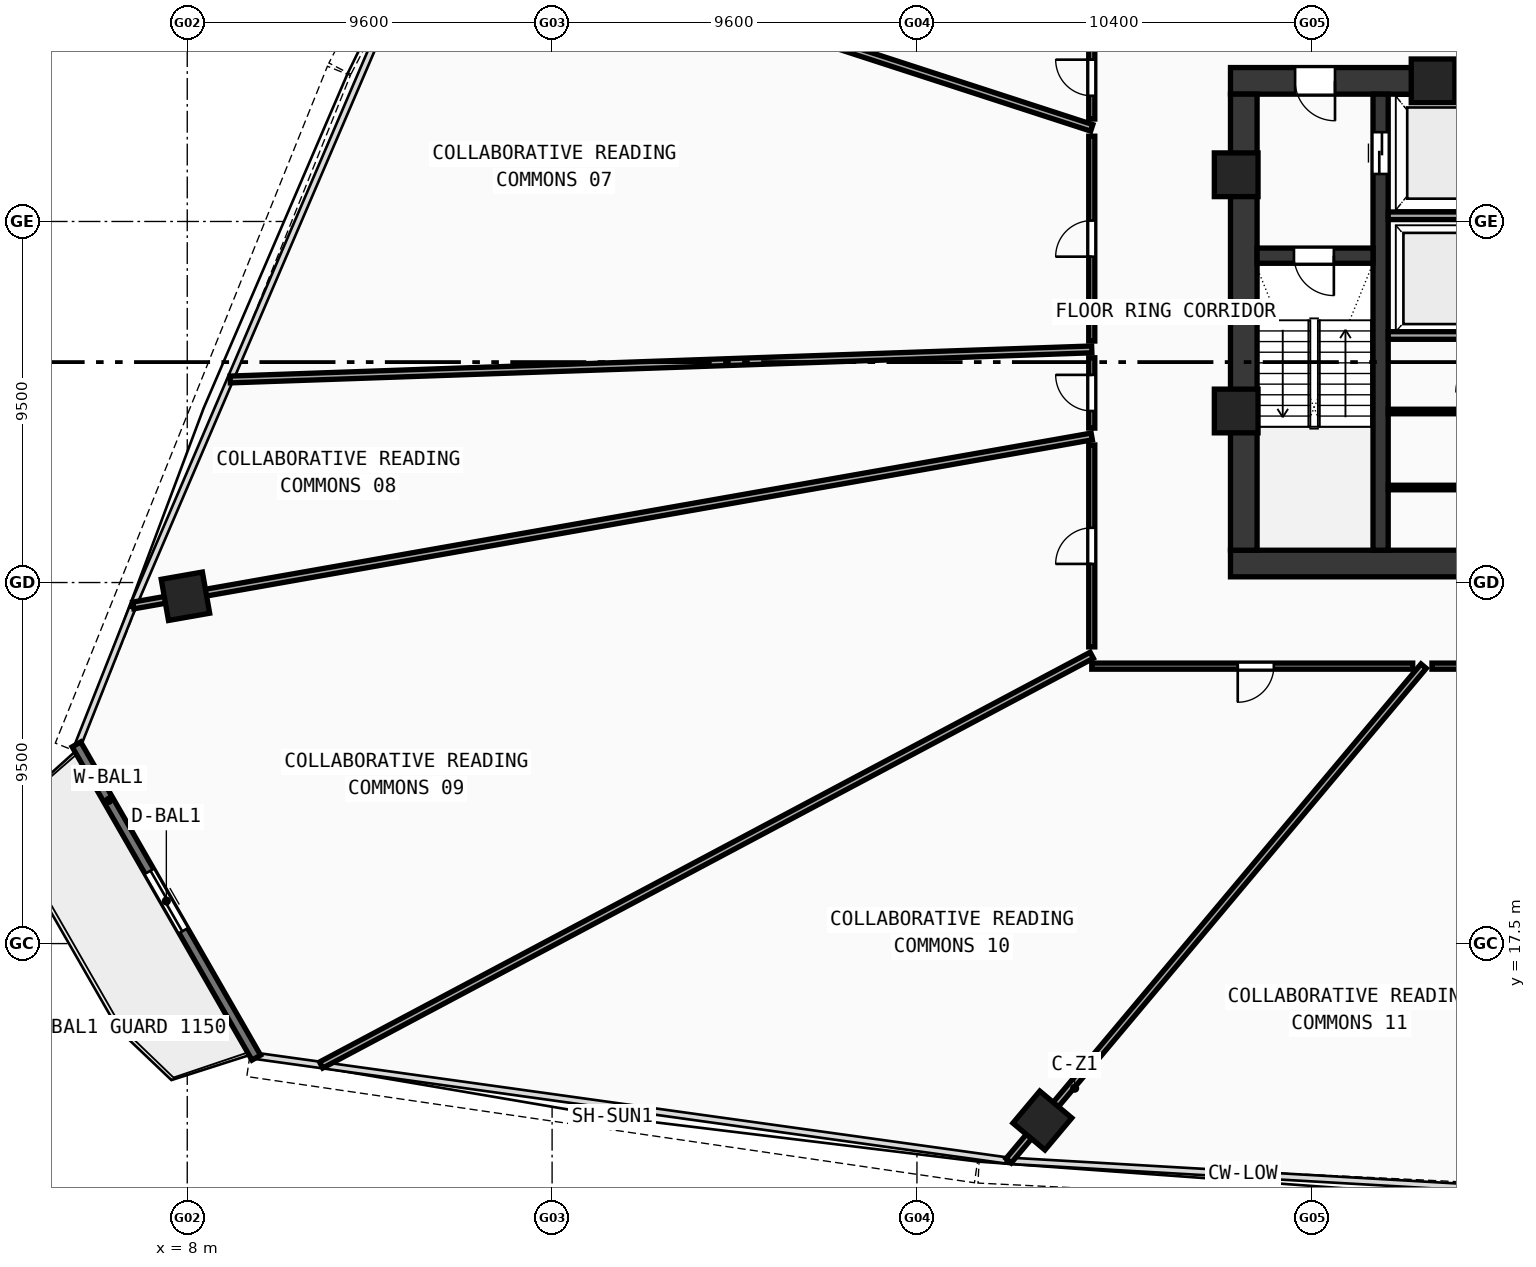
"""IFC4 building model, lengths in metres.
Left out: names, types, materials, properties, quantities, classifications, styles, units other than length and angle.
Written with IfcOpenShell. Run it as: python <this file> out.ifc"""

import sys

from ifc_helpers import new_model, si_unit, direction, frame, frame_2d, origin, origin_with_axes, origin_2d, place, context, subcontext, project, spatial, rectangle, hollow_rectangle, extrude, source, transform, mapped, element, fill, save


model = new_model("IFC4")
c1 = context("Model", 3, precision=1e-05, world=origin(), true_north=direction((0.0, 1.0)))
c2 = subcontext(c1, "Body", "Model", "MODEL_VIEW")
j1 = project(units=[si_unit("LENGTHUNIT", "METRE"), si_unit("PLANEANGLEUNIT", "RADIAN")], contexts=[c1])
p1 = place(None, origin())
s1 = spatial("IfcSite", under=j1, at=p1, CompositionType="ELEMENT")
p2 = place(p1, origin())
s2 = spatial("IfcBuilding", under=s1, at=p2, CompositionType="ELEMENT")
p3 = place(p2, frame((0.0, 0.0, 55.81)))
s3 = spatial("IfcBuildingStorey", under=s2, at=p3, CompositionType="ELEMENT", Elevation=55.81)
p4 = place(p3, frame((35.45, 27.5, 0.0), z_axis=(0.0, 0.0, 1.0), x_axis=(1.0, 0.0, 0.0)))
e1 = element("IfcWall", 1, at=p4, inside=s3, PredefinedType="SHEAR", context=c2, shape_type="SweptSolid", body=[
    extrude(rectangle(XDim=25.1, YDim=0.7, at=frame_2d((12.55, 0.0))), origin(), (0.0, 0.0, 1.0), 3.37),
])
p5 = place(p3, frame((35.45, 40.2, 0.0), z_axis=(0.0, 0.0, 1.0), x_axis=(1.0, 0.0, 0.0)))
e2 = element("IfcWall", 2, at=p5, inside=s3, PredefinedType="SHEAR", context=c2, shape_type="SweptSolid", body=[
    extrude(rectangle(XDim=11.35, YDim=0.7, at=frame_2d((5.675, 0.0))), origin(), (0.0, 0.0, 1.0), 3.37),
])
p6 = place(p5, frame((1.7, 0.0, 0.0)))
e3 = element("IfcOpeningElement", 3, at=p6, cuts=e2, PredefinedType="OPENING", context=c2, shape_type="SweptSolid", body=[
    extrude(rectangle(XDim=1.05, YDim=2.1, at=frame_2d((0.525, 1.05))), frame((0.0, 0.36, 0.0), z_axis=(0.0, -1.0, 0.0), x_axis=(1.0, 0.0, 0.0)), (0.0, 0.0, 1.0), 0.72),
])
p7 = place(p3, frame((35.8, 27.85, 0.0), z_axis=(0.0, 0.0, 1.0), x_axis=(0.0, 1.0, 0.0)))
e4 = element("IfcWall", 4, at=p7, inside=s3, PredefinedType="SHEAR", context=c2, shape_type="SweptSolid", body=[
    extrude(rectangle(XDim=12.0, YDim=0.7, at=frame_2d((6.0, 0.0))), origin(), (0.0, 0.0, 1.0), 3.37),
])
p8 = place(p3, frame((39.4, 27.85, 0.0), z_axis=(0.0, 0.0, 1.0), x_axis=(0.0, 1.0, 0.0)))
e5 = element("IfcWall", 5, at=p8, inside=s3, PredefinedType="SHEAR", context=c2, shape_type="SweptSolid", body=[
    extrude(rectangle(XDim=12.0, YDim=0.4, at=frame_2d((6.0, 0.0))), origin(), (0.0, 0.0, 1.0), 3.37),
])
p9 = place(p8, frame((9.9, 0.0, 0.0)))
e6 = element("IfcOpeningElement", 6, at=p9, cuts=e5, PredefinedType="OPENING", context=c2, shape_type="SweptSolid", body=[
    extrude(rectangle(XDim=1.1, YDim=2.1, at=frame_2d((0.55, 1.05))), frame((0.0, 0.21, 0.0), z_axis=(0.0, -1.0, 0.0), x_axis=(1.0, 0.0, 0.0)), (0.0, 0.0, 1.0), 0.42),
])
p10 = place(p3, frame((36.15, 35.6, 0.0), z_axis=(0.0, 0.0, 1.0), x_axis=(1.0, 0.0, 0.0)))
e7 = element("IfcWall", 7, at=p10, inside=s3, PredefinedType="SHEAR", context=c2, shape_type="SweptSolid", body=[
    extrude(rectangle(XDim=3.05, YDim=0.4, at=frame_2d((1.525, 0.0))), origin(), (0.0, 0.0, 1.0), 3.37),
])
p11 = place(p10, frame((0.97, 0.0, 0.0)))
e8 = element("IfcOpeningElement", 8, at=p11, cuts=e7, PredefinedType="OPENING", context=c2, shape_type="SweptSolid", body=[
    extrude(rectangle(XDim=1.05, YDim=2.1, at=frame_2d((0.525, 1.05))), frame((0.0, 0.21, 0.0), z_axis=(0.0, -1.0, 0.0), x_axis=(1.0, 0.0, 0.0)), (0.0, 0.0, 1.0), 0.42),
])
m1 = source(origin(), c2, "Body", "SweptSolid", [
    extrude(hollow_rectangle(XDim=1.15, YDim=1.15, WallThickness=0.048, at=origin_2d()), origin(), (0.0, 0.0, 1.0), 3.63),
])
for number, where, z_axis, x_axis in (
    (9, (40.781, 40.2, -0.26), (0.0, 0.0, 1.0), (1.0, 0.0, 0.0)),
    (10, (35.6, 37.729, -0.26), (0.0, 0.0, 1.0), (1.0, 0.0, 0.0)),
    (11, (35.6, 31.513, -0.26), (0.0, 0.0, 1.0), (1.0, 0.0, 0.0)),
):
    element("IfcColumn", number, at=place(p3, frame(where, z_axis=z_axis, x_axis=x_axis)), inside=s3, PredefinedType="COLUMN", context=c2, shape_type="MappedRepresentation", body=[
        mapped(m1, transform((0.0, 0.0, 0.0), scale=1.0)),
    ])
m2 = source(origin(), c2, "Body", "SweptSolid", [
    extrude(hollow_rectangle(XDim=1.1, YDim=1.1, WallThickness=0.045, at=origin_2d()), origin(), (0.0, 0.0, 1.0), 3.63),
])
for number, where, z_axis, x_axis in (
    (12, (30.5, 12.844, -0.26), (0.0, 0.0, 1.0), (0.766, -0.643, 0.0)),
    (13, (7.952, 26.638, -0.26), (0.0, 0.0, 1.0), (0.174, -0.985, 0.0)),
):
    element("IfcColumn", number, at=place(p3, frame(where, z_axis=z_axis, x_axis=x_axis)), inside=s3, PredefinedType="COLUMN", context=c2, shape_type="MappedRepresentation", body=[
        mapped(m2, transform((0.0, 0.0, 0.0), scale=1.0)),
    ])
p12 = place(p3, frame((5.084, 22.741, 0.0), z_axis=(0.0, 0.0, 1.0), x_axis=(0.497919395469, -0.86722331358, 0.0)))
e14 = element("IfcWall", 14, at=p12, inside=s3, PredefinedType="STANDARD", context=c2, shape_type="SweptSolid", body=[
    extrude(rectangle(XDim=9.504, YDim=0.26, at=frame_2d((4.752, 0.0))), origin(), (0.0, 0.0, 1.0), 3.37),
])
p13 = place(p12, frame((3.852, 0.0, 0.0)))
e15 = element("IfcOpeningElement", 15, at=p13, cuts=e14, PredefinedType="OPENING", context=c2, shape_type="SweptSolid", body=[
    extrude(rectangle(XDim=1.8, YDim=2.15, at=frame_2d((0.9, 1.075))), frame((0.0, 0.14, 0.0), z_axis=(0.0, -1.0, 0.0), x_axis=(1.0, 0.0, 0.0)), (0.0, 0.0, 1.0), 0.28),
])
for number, where, z_axis, x_axis in (
    (16, (39.6, 36.65, 0.0), (0.0, 0.0, 1.0), (1.0, 0.0, 0.0)),
    (17, (39.6, 33.5, 0.0), (0.0, 0.0, 1.0), (1.0, 0.0, 0.0)),
):
    element("IfcWall", number, at=place(p3, frame(where, z_axis=z_axis, x_axis=x_axis)), inside=s3, PredefinedType="SOLIDWALL", context=c2, shape_type="SweptSolid", body=[
        extrude(rectangle(XDim=2.72, YDim=0.2, at=frame_2d((1.36, 0.0))), origin(), (0.0, 0.0, 1.0), 3.37),
    ])
for number, where, z_axis, x_axis in (
    (18, (39.6, 29.5, 0.0), (0.0, 0.0, 1.0), (1.0, 0.0, 0.0)),
    (19, (39.6, 31.5, 0.0), (0.0, 0.0, 1.0), (1.0, 0.0, 0.0)),
):
    element("IfcWall", number, at=place(p3, frame(where, z_axis=z_axis, x_axis=x_axis)), inside=s3, PredefinedType="PARTITIONING", context=c2, shape_type="SweptSolid", body=[
        extrude(rectangle(XDim=2.72, YDim=0.12, at=frame_2d((1.36, 0.0))), origin(), (0.0, 0.0, 1.0), 3.37),
    ])
p14 = place(p3, frame((31.8, 38.964, 0.0), z_axis=(0.0, 0.0, 1.0), x_axis=(-0.951052304058, 0.309029958006, 0.0)))
e20 = element("IfcWall", 20, at=p14, inside=s3, PredefinedType="PARTITIONING", context=c2, shape_type="SweptSolid", body=[
    extrude(rectangle(XDim=18.299, YDim=0.18, at=frame_2d((9.149, 0.0))), origin(), (0.0, 0.0, 1.0), 2.67),
])
p15 = place(p3, frame((31.8, 33.134, 0.0), z_axis=(0.0, 0.0, 1.0), x_axis=(-0.999390651746, -0.034904515515, 0.0)))
e21 = element("IfcWall", 21, at=p15, inside=s3, PredefinedType="PARTITIONING", context=c2, shape_type="SweptSolid", body=[
    extrude(rectangle(XDim=22.683, YDim=0.18, at=frame_2d((11.342, 0.0))), origin(), (0.0, 0.0, 1.0), 2.67),
])
p16 = place(p3, frame((31.8, 30.844, 0.0), z_axis=(0.0, 0.0, 1.0), x_axis=(-0.984808213418, -0.173645566555, 0.0)))
e22 = element("IfcWall", 22, at=p16, inside=s3, PredefinedType="PARTITIONING", context=c2, shape_type="SweptSolid", body=[
    extrude(rectangle(XDim=25.61, YDim=0.18, at=frame_2d((12.805, 0.0))), origin(), (0.0, 0.0, 1.0), 2.67),
])
p17 = place(p3, frame((31.8, 25.086, 0.0), z_axis=(0.0, 0.0, 1.0), x_axis=(-0.882952279159, -0.469462749032, 0.0)))
e23 = element("IfcWall", 23, at=p17, inside=s3, PredefinedType="PARTITIONING", context=c2, shape_type="SweptSolid", body=[
    extrude(rectangle(XDim=22.965, YDim=0.18, at=frame_2d((11.482, 0.0))), origin(), (0.0, 0.0, 1.0), 2.67),
])
p18 = place(p3, frame((40.532, 24.8, 0.0), z_axis=(0.0, 0.0, 1.0), x_axis=(-0.642791593325, -0.766041100432, 0.0)))
e24 = element("IfcWall", 24, at=p18, inside=s3, PredefinedType="PARTITIONING", context=c2, shape_type="SweptSolid", body=[
    extrude(rectangle(XDim=16.988, YDim=0.18, at=frame_2d((8.494, 0.0))), origin(), (0.0, 0.0, 1.0), 2.67),
])
p19 = place(p3, frame((31.8, 25.306, 0.0), z_axis=(0.0, 0.0, 1.0), x_axis=(0.0, 1.0, 0.0)))
e25 = element("IfcWall", 25, at=p19, inside=s3, PredefinedType="PARTITIONING", context=c2, shape_type="SweptSolid", body=[
    extrude(rectangle(XDim=5.314, YDim=0.16, at=frame_2d((2.657, 0.0))), origin(), (0.0, 0.0, 1.0), 2.97),
])
p20 = place(p19, frame((2.184, 0.0, 0.0)))
e26 = element("IfcOpeningElement", 26, at=p20, cuts=e25, PredefinedType="OPENING", context=c2, shape_type="SweptSolid", body=[
    extrude(rectangle(XDim=0.95, YDim=2.1, at=frame_2d((0.475, 1.05))), frame((0.0, 0.09, 0.0), z_axis=(0.0, -1.0, 0.0), x_axis=(1.0, 0.0, 0.0)), (0.0, 0.0, 1.0), 0.18),
])
p21 = place(p3, frame((31.8, 31.063, 0.0), z_axis=(0.0, 0.0, 1.0), x_axis=(0.0, 1.0, 0.0)))
e27 = element("IfcWall", 27, at=p21, inside=s3, PredefinedType="PARTITIONING", context=c2, shape_type="SweptSolid", body=[
    extrude(rectangle(XDim=1.851, YDim=0.16, at=frame_2d((0.926, 0.0))), origin(), (0.0, 0.0, 1.0), 3.37),
])
p22 = place(p21, frame((0.451, 0.0, 0.0)))
e28 = element("IfcOpeningElement", 28, at=p22, cuts=e27, PredefinedType="OPENING", context=c2, shape_type="SweptSolid", body=[
    extrude(rectangle(XDim=0.95, YDim=2.1, at=frame_2d((0.475, 1.05))), frame((0.0, 0.09, 0.0), z_axis=(0.0, -1.0, 0.0), x_axis=(1.0, 0.0, 0.0)), (0.0, 0.0, 1.0), 0.18),
])
p23 = place(p3, frame((31.8, 33.354, 0.0), z_axis=(0.0, 0.0, 1.0), x_axis=(0.0, 1.0, 0.0)))
e29 = element("IfcWall", 29, at=p23, inside=s3, PredefinedType="PARTITIONING", context=c2, shape_type="SweptSolid", body=[
    extrude(rectangle(XDim=5.39, YDim=0.16, at=frame_2d((2.695, 0.0))), origin(), (0.0, 0.0, 1.0), 3.37),
])
p24 = place(p23, frame((2.22, 0.0, 0.0)))
e30 = element("IfcOpeningElement", 30, at=p24, cuts=e29, PredefinedType="OPENING", context=c2, shape_type="SweptSolid", body=[
    extrude(rectangle(XDim=0.95, YDim=2.1, at=frame_2d((0.475, 1.05))), frame((0.0, 0.09, 0.0), z_axis=(0.0, -1.0, 0.0), x_axis=(1.0, 0.0, 0.0)), (0.0, 0.0, 1.0), 0.18),
])
p25 = place(p3, frame((31.8, 39.195, 0.0), z_axis=(0.0, 0.0, 1.0), x_axis=(0.0, 1.0, 0.0)))
e31 = element("IfcWall", 31, at=p25, inside=s3, PredefinedType="PARTITIONING", context=c2, shape_type="SweptSolid", body=[
    extrude(rectangle(XDim=2.187, YDim=0.16, at=frame_2d((1.093, 0.0))), origin(), (0.0, 0.0, 1.0), 3.37),
])
p26 = place(p25, frame((0.613, 0.0, 0.0)))
e32 = element("IfcOpeningElement", 32, at=p26, cuts=e31, PredefinedType="OPENING", context=c2, shape_type="SweptSolid", body=[
    extrude(rectangle(XDim=0.95, YDim=2.1, at=frame_2d((0.475, 1.05))), frame((0.0, 0.09, 0.0), z_axis=(0.0, -1.0, 0.0), x_axis=(1.0, 0.0, 0.0)), (0.0, 0.0, 1.0), 0.18),
])
p27 = place(p3, frame((45.387, 24.8, 0.0), z_axis=(0.0, 0.0, 1.0), x_axis=(-1.0, 0.0, 0.0)))
e33 = element("IfcWall", 33, at=p27, inside=s3, PredefinedType="PARTITIONING", context=c2, shape_type="SweptSolid", body=[
    extrude(rectangle(XDim=4.635, YDim=0.16, at=frame_2d((2.318, 0.0))), origin(), (0.0, 0.0, 1.0), 2.67),
])
p28 = place(p27, frame((1.839, 0.0, 0.0)))
e34 = element("IfcOpeningElement", 34, at=p28, cuts=e33, PredefinedType="OPENING", context=c2, shape_type="SweptSolid", body=[
    extrude(rectangle(XDim=0.95, YDim=2.1, at=frame_2d((0.475, 1.05))), frame((0.0, 0.09, 0.0), z_axis=(0.0, -1.0, 0.0), x_axis=(1.0, 0.0, 0.0)), (0.0, 0.0, 1.0), 0.18),
])
p29 = place(p3, frame((40.245, 24.8, 0.0), z_axis=(0.0, 0.0, 1.0), x_axis=(-1.0, 0.0, 0.0)))
e35 = element("IfcWall", 35, at=p29, inside=s3, PredefinedType="PARTITIONING", context=c2, shape_type="SweptSolid", body=[
    extrude(rectangle(XDim=8.445, YDim=0.16, at=frame_2d((4.222, 0.0))), origin(), (0.0, 0.0, 1.0), 2.97),
])
p30 = place(p29, frame((3.654, 0.0, 0.0)))
e36 = element("IfcOpeningElement", 36, at=p30, cuts=e35, PredefinedType="OPENING", context=c2, shape_type="SweptSolid", body=[
    extrude(rectangle(XDim=0.95, YDim=2.1, at=frame_2d((0.475, 1.05))), frame((0.0, 0.09, 0.0), z_axis=(0.0, -1.0, 0.0), x_axis=(1.0, 0.0, 0.0)), (0.0, 0.0, 1.0), 0.18),
])
m3 = source(origin(), c2, "Body", "SweptSolid", [
    extrude(rectangle(XDim=1.8, YDim=2.15, at=frame_2d((0.9, 1.075))), frame((0.0, 0.025, 0.0), z_axis=(0.0, -1.0, 0.0), x_axis=(1.0, 0.0, 0.0)), (0.0, 0.0, 1.0), 0.05),
])
p31 = place(p13, origin_with_axes())
e37 = element("IfcDoor", 37, at=p31, inside=s3, OperationType="DOUBLE_DOOR_SLIDING", PredefinedType="DOOR", context=c2, shape_type="MappedRepresentation", body=[
    mapped(m3, transform((0.0, 0.0, 0.0), scale=1.0)),
])
fill(e15, e37)
m4 = source(origin(), c2, "Body", "SweptSolid", [
    extrude(rectangle(XDim=1.05, YDim=2.1, at=frame_2d((0.525, 1.05))), frame((0.0, 0.025, 0.0), z_axis=(0.0, -1.0, 0.0), x_axis=(1.0, 0.0, 0.0)), (0.0, 0.0, 1.0), 0.05),
])
p32 = place(p11, frame((1.05, 0.0, 0.0), z_axis=(0.0, 0.0, 1.0), x_axis=(-1.0, 0.0, 0.0)))
e38 = element("IfcDoor", 38, at=p32, inside=s3, OperationType="SINGLE_SWING_LEFT", PredefinedType="DOOR", context=c2, shape_type="MappedRepresentation", body=[
    mapped(m4, transform((0.0, 0.0, 0.0), scale=1.0)),
])
fill(e8, e38)
p33 = place(p6, frame((1.05, 0.0, 0.0), z_axis=(0.0, 0.0, 1.0), x_axis=(-1.0, 0.0, 0.0)))
e39 = element("IfcDoor", 39, at=p33, inside=s3, OperationType="SINGLE_SWING_LEFT", PredefinedType="DOOR", context=c2, shape_type="MappedRepresentation", body=[
    mapped(m4, transform((0.0, 0.0, 0.0), scale=1.0)),
])
fill(e3, e39)
m5 = source(origin(), c2, "Body", "SweptSolid", [
    extrude(rectangle(XDim=1.1, YDim=2.1, at=frame_2d((0.55, 1.05))), frame((0.0, 0.025, 0.0), z_axis=(0.0, -1.0, 0.0), x_axis=(1.0, 0.0, 0.0)), (0.0, 0.0, 1.0), 0.05),
])
p34 = place(p9, frame((1.1, 0.0, 0.0), z_axis=(0.0, 0.0, 1.0), x_axis=(-1.0, 0.0, 0.0)))
e40 = element("IfcDoor", 40, at=p34, inside=s3, OperationType="DOUBLE_DOOR_SLIDING", PredefinedType="DOOR", context=c2, shape_type="MappedRepresentation", body=[
    mapped(m5, transform((0.0, 0.0, 0.0), scale=1.0)),
])
fill(e6, e40)
m6 = source(origin(), c2, "Body", "SweptSolid", [
    extrude(rectangle(XDim=0.95, YDim=2.1, at=frame_2d((0.475, 1.05))), frame((0.0, 0.025, 0.0), z_axis=(0.0, -1.0, 0.0), x_axis=(1.0, 0.0, 0.0)), (0.0, 0.0, 1.0), 0.05),
])
p35 = place(p26, origin_with_axes())
e41 = element("IfcDoor", 41, at=p35, inside=s3, OperationType="SINGLE_SWING_RIGHT", PredefinedType="DOOR", context=c2, shape_type="MappedRepresentation", body=[
    mapped(m6, transform((0.0, 0.0, 0.0), scale=1.0)),
])
fill(e32, e41)
p36 = place(p24, origin_with_axes())
e42 = element("IfcDoor", 42, at=p36, inside=s3, OperationType="SINGLE_SWING_LEFT", PredefinedType="DOOR", context=c2, shape_type="MappedRepresentation", body=[
    mapped(m6, transform((0.0, 0.0, 0.0), scale=1.0)),
])
fill(e30, e42)
p37 = place(p22, origin_with_axes())
e43 = element("IfcDoor", 43, at=p37, inside=s3, OperationType="SINGLE_SWING_RIGHT", PredefinedType="DOOR", context=c2, shape_type="MappedRepresentation", body=[
    mapped(m6, transform((0.0, 0.0, 0.0), scale=1.0)),
])
fill(e28, e43)
p38 = place(p20, origin_with_axes())
e44 = element("IfcDoor", 44, at=p38, inside=s3, OperationType="SINGLE_SWING_LEFT", PredefinedType="DOOR", context=c2, shape_type="MappedRepresentation", body=[
    mapped(m6, transform((0.0, 0.0, 0.0), scale=1.0)),
])
fill(e26, e44)
p39 = place(p30, origin_with_axes())
e45 = element("IfcDoor", 45, at=p39, inside=s3, OperationType="SINGLE_SWING_RIGHT", PredefinedType="DOOR", context=c2, shape_type="MappedRepresentation", body=[
    mapped(m6, transform((0.0, 0.0, 0.0), scale=1.0)),
])
fill(e36, e45)
save(model, sys.argv[1])
